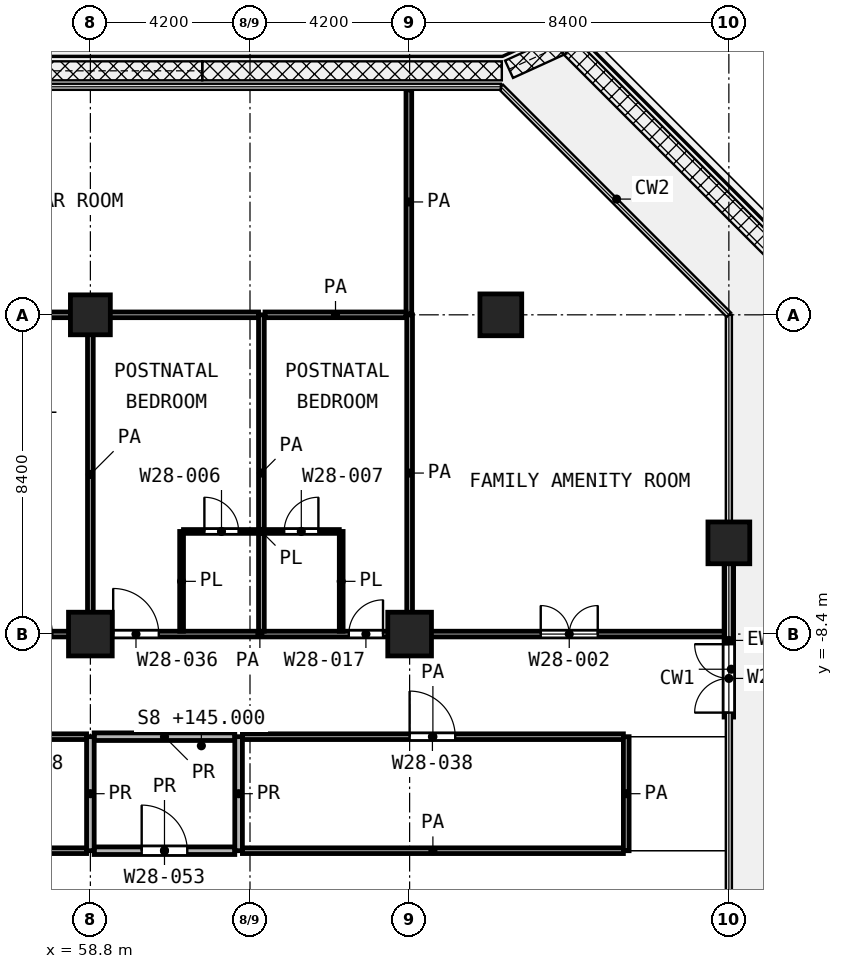
"""IFC4 building model, lengths in metres.
Left out: names, types, materials, properties, quantities, classifications, styles, units other than length and angle.
Written with IfcOpenShell. Run it as: python <this file> out.ifc"""

import sys

from ifc_helpers import new_model, si_unit, direction, frame, frame_2d, origin, origin_2d, place, context, subcontext, project, spatial, rectangle, extrude, element, fill, save


model = new_model("IFC4")
c1 = context("Model", 3, precision=1e-05, world=origin(), true_north=direction((0.0, 1.0)))
c2 = subcontext(c1, "Body", "Model", "MODEL_VIEW")
j1 = project(units=[si_unit("LENGTHUNIT", "METRE"), si_unit("PLANEANGLEUNIT", "RADIAN")], contexts=[c1])
p1 = place(None, origin())
s1 = spatial("IfcSite", under=j1, at=p1, CompositionType="ELEMENT")
p2 = place(p1, origin())
s2 = spatial("IfcBuilding", under=s1, at=p2, CompositionType="ELEMENT")
p3 = place(p2, frame((0.0, 0.0, 145.0)))
s3 = spatial("IfcBuildingStorey", under=s2, at=p3, CompositionType="ELEMENT", Elevation=145.0)
p4 = place(p3, frame((58.8, 0.0, 0.0), z_axis=(0.0, 0.0, 1.0), x_axis=(1.0, 0.0, 0.0)))
e1 = element("IfcColumn", 1, at=p4, inside=s3, PredefinedType="COLUMN", context=c2, shape_type="SweptSolid", body=[
    extrude(rectangle(XDim=1.05, YDim=1.05, at=origin_2d()), origin(), (0.0, 0.0, 1.0), 4.2),
])
for number, where, z_axis, x_axis in (
    (2, (69.6, 0.0, 0.0), (0.0, 0.0, 1.0), (1.0, 0.0, 0.0)),
    (3, (75.6, -6.0, 0.0), (0.0, 0.0, 1.0), (1.0, 0.0, 0.0)),
):
    element("IfcColumn", number, at=place(p3, frame(where, z_axis=z_axis, x_axis=x_axis)), inside=s3, PredefinedType="COLUMN", context=c2, shape_type="SweptSolid", body=[
        extrude(rectangle(XDim=1.1, YDim=1.1, at=origin_2d()), origin(), (0.0, 0.0, 1.0), 4.2),
    ])
for number, where, z_axis, x_axis in (
    (4, (58.8, -8.4, 0.0), (0.0, 0.0, 1.0), (1.0, 0.0, 0.0)),
    (5, (67.2, -8.4, 0.0), (0.0, 0.0, 1.0), (1.0, 0.0, 0.0)),
):
    element("IfcColumn", number, at=place(p3, frame(where, z_axis=z_axis, x_axis=x_axis)), inside=s3, PredefinedType="COLUMN", context=c2, shape_type="SweptSolid", body=[
        extrude(rectangle(XDim=1.15, YDim=1.15, at=origin_2d()), origin(), (0.0, 0.0, 1.0), 4.2),
    ])
p5 = place(p3, frame((75.6, -10.583, 0.0), z_axis=(0.0, 0.0, 1.0), x_axis=(0.0, 1.0, 0.0)))
e6 = element("IfcWall", 6, at=p5, inside=s3, PredefinedType="SOLIDWALL", context=c2, shape_type="SweptSolid", body=[
    extrude(rectangle(XDim=4.033, YDim=0.25, at=frame_2d((2.017, 0.0))), origin(), (0.0, 0.0, 1.0), 3.48),
])
p6 = place(p5, frame((0.117, 0.0, 0.0)))
e7 = element("IfcOpeningElement", 7, at=p6, cuts=e6, PredefinedType="OPENING", context=c2, shape_type="SweptSolid", body=[
    extrude(rectangle(XDim=1.8, YDim=2.1, at=frame_2d((0.9, 1.05))), frame((0.0, 0.135, 0.0), z_axis=(0.0, -1.0, 0.0), x_axis=(1.0, 0.0, 0.0)), (0.0, 0.0, 1.0), 0.27),
])
p7 = place(p3, frame((61.25, -5.7, 0.0), z_axis=(0.0, 0.0, 1.0), x_axis=(1.0, 0.0, 0.0)))
e8 = element("IfcWall", 8, at=p7, inside=s3, PredefinedType="PARTITIONING", context=c2, shape_type="SweptSolid", body=[
    extrude(rectangle(XDim=4.1, YDim=0.1, at=frame_2d((2.05, 0.0))), origin(), (0.0, 0.0, 1.0), 3.6),
])
p8 = place(p7, frame((0.55, 0.0, 0.0)))
e9 = element("IfcOpeningElement", 9, at=p8, cuts=e8, PredefinedType="OPENING", context=c2, shape_type="SweptSolid", body=[
    extrude(rectangle(XDim=0.9, YDim=2.1, at=frame_2d((0.45, 1.05))), frame((0.0, 0.06, 0.0), z_axis=(0.0, -1.0, 0.0), x_axis=(1.0, 0.0, 0.0)), (0.0, 0.0, 1.0), 0.12),
])
p9 = place(p7, frame((2.65, 0.0, 0.0)))
e10 = element("IfcOpeningElement", 10, at=p9, cuts=e8, PredefinedType="OPENING", context=c2, shape_type="SweptSolid", body=[
    extrude(rectangle(XDim=0.9, YDim=2.1, at=frame_2d((0.45, 1.05))), frame((0.0, 0.06, 0.0), z_axis=(0.0, -1.0, 0.0), x_axis=(1.0, 0.0, 0.0)), (0.0, 0.0, 1.0), 0.12),
])
for number, where, z_axis, x_axis in (
    (11, (61.2, -8.325, 0.0), (0.0, 0.0, 1.0), (0.0, 1.0, 0.0)),
    (12, (65.4, -8.325, 0.0), (0.0, 0.0, 1.0), (0.0, 1.0, 0.0)),
):
    element("IfcWall", number, at=place(p3, frame(where, z_axis=z_axis, x_axis=x_axis)), inside=s3, PredefinedType="PARTITIONING", context=c2, shape_type="SweptSolid", body=[
        extrude(rectangle(XDim=2.625, YDim=0.1, at=frame_2d((1.312, 0.0))), origin(), (0.0, 0.0, 1.0), 3.6),
    ])
p10 = place(p3, frame((29.475, -14.1, 0.0), z_axis=(0.0, 0.0, 1.0), x_axis=(1.0, 0.0, 0.0)))
e13 = element("IfcWall", 13, at=p10, inside=s3, PredefinedType="PARTITIONING", context=c2, shape_type="SweptSolid", body=[
    extrude(rectangle(XDim=29.225, YDim=0.15, at=frame_2d((14.612, 0.0))), origin(), (0.0, 0.0, 1.0), 3.6),
])
p11 = place(p10, frame((18.325, 0.0, 0.0)))
e14 = element("IfcOpeningElement", 14, at=p11, cuts=e13, PredefinedType="OPENING", context=c2, shape_type="SweptSolid", body=[
    extrude(rectangle(XDim=1.0, YDim=2.1, at=frame_2d((0.5, 1.05))), frame((0.0, 0.085, 0.0), z_axis=(0.0, -1.0, 0.0), x_axis=(1.0, 0.0, 0.0)), (0.0, 0.0, 1.0), 0.17),
])
p12 = place(p3, frame((62.8, -14.1, 0.0), z_axis=(0.0, 0.0, 1.0), x_axis=(1.0, 0.0, 0.0)))
e15 = element("IfcWall", 15, at=p12, inside=s3, PredefinedType="PARTITIONING", context=c2, shape_type="SweptSolid", body=[
    extrude(rectangle(XDim=10.025, YDim=0.15, at=frame_2d((5.012, 0.0))), origin(), (0.0, 0.0, 1.0), 3.6),
])
p13 = place(p3, frame((29.475, -11.1, 0.0), z_axis=(0.0, 0.0, 1.0), x_axis=(1.0, 0.0, 0.0)))
e16 = element("IfcWall", 16, at=p13, inside=s3, PredefinedType="PARTITIONING", context=c2, shape_type="SweptSolid", body=[
    extrude(rectangle(XDim=29.225, YDim=0.15, at=frame_2d((14.612, 0.0))), origin(), (0.0, 0.0, 1.0), 3.6),
])
p14 = place(p13, frame((3.225, 0.0, 0.0)))
e17 = element("IfcOpeningElement", 17, at=p14, cuts=e16, PredefinedType="OPENING", context=c2, shape_type="SweptSolid", body=[
    extrude(rectangle(XDim=1.2, YDim=2.1, at=frame_2d((0.6, 1.05))), frame((0.0, 0.085, 0.0), z_axis=(0.0, -1.0, 0.0), x_axis=(1.0, 0.0, 0.0)), (0.0, 0.0, 1.0), 0.17),
])
p15 = place(p13, frame((11.725, 0.0, 0.0)))
e18 = element("IfcOpeningElement", 18, at=p15, cuts=e16, PredefinedType="OPENING", context=c2, shape_type="SweptSolid", body=[
    extrude(rectangle(XDim=1.0, YDim=2.1, at=frame_2d((0.5, 1.05))), frame((0.0, 0.085, 0.0), z_axis=(0.0, -1.0, 0.0), x_axis=(1.0, 0.0, 0.0)), (0.0, 0.0, 1.0), 0.17),
])
p16 = place(p13, frame((22.825, 0.0, 0.0)))
e19 = element("IfcOpeningElement", 19, at=p16, cuts=e16, PredefinedType="OPENING", context=c2, shape_type="SweptSolid", body=[
    extrude(rectangle(XDim=1.0, YDim=2.1, at=frame_2d((0.5, 1.05))), frame((0.0, 0.085, 0.0), z_axis=(0.0, -1.0, 0.0), x_axis=(1.0, 0.0, 0.0)), (0.0, 0.0, 1.0), 0.17),
])
p17 = place(p13, frame((27.025, 0.0, 0.0)))
e20 = element("IfcOpeningElement", 20, at=p17, cuts=e16, PredefinedType="OPENING", context=c2, shape_type="SweptSolid", body=[
    extrude(rectangle(XDim=1.0, YDim=2.1, at=frame_2d((0.5, 1.05))), frame((0.0, 0.085, 0.0), z_axis=(0.0, -1.0, 0.0), x_axis=(1.0, 0.0, 0.0)), (0.0, 0.0, 1.0), 0.17),
])
p18 = place(p3, frame((62.8, -11.1, 0.0), z_axis=(0.0, 0.0, 1.0), x_axis=(1.0, 0.0, 0.0)))
e21 = element("IfcWall", 21, at=p18, inside=s3, PredefinedType="PARTITIONING", context=c2, shape_type="SweptSolid", body=[
    extrude(rectangle(XDim=10.025, YDim=0.15, at=frame_2d((5.012, 0.0))), origin(), (0.0, 0.0, 1.0), 3.6),
])
p19 = place(p18, frame((4.4, 0.0, 0.0)))
e22 = element("IfcOpeningElement", 22, at=p19, cuts=e21, PredefinedType="OPENING", context=c2, shape_type="SweptSolid", body=[
    extrude(rectangle(XDim=1.2, YDim=2.1, at=frame_2d((0.6, 1.05))), frame((0.0, 0.085, 0.0), z_axis=(0.0, -1.0, 0.0), x_axis=(1.0, 0.0, 0.0)), (0.0, 0.0, 1.0), 0.17),
])
p20 = place(p3, frame((51.0, -8.4, 0.0), z_axis=(0.0, 0.0, 1.0), x_axis=(1.0, 0.0, 0.0)))
e23 = element("IfcWall", 23, at=p20, inside=s3, PredefinedType="PARTITIONING", context=c2, shape_type="SweptSolid", body=[
    extrude(rectangle(XDim=24.52, YDim=0.15, at=frame_2d((12.26, 0.0))), origin(), (0.0, 0.0, 1.0), 3.6),
])
p21 = place(p20, frame((5.6, 0.0, 0.0)))
e24 = element("IfcOpeningElement", 24, at=p21, cuts=e23, PredefinedType="OPENING", context=c2, shape_type="SweptSolid", body=[
    extrude(rectangle(XDim=1.2, YDim=2.1, at=frame_2d((0.6, 1.05))), frame((0.0, 0.085, 0.0), z_axis=(0.0, -1.0, 0.0), x_axis=(1.0, 0.0, 0.0)), (0.0, 0.0, 1.0), 0.17),
])
p22 = place(p20, frame((8.4, 0.0, 0.0)))
e25 = element("IfcOpeningElement", 25, at=p22, cuts=e23, PredefinedType="OPENING", context=c2, shape_type="SweptSolid", body=[
    extrude(rectangle(XDim=1.2, YDim=2.1, at=frame_2d((0.6, 1.05))), frame((0.0, 0.085, 0.0), z_axis=(0.0, -1.0, 0.0), x_axis=(1.0, 0.0, 0.0)), (0.0, 0.0, 1.0), 0.17),
])
p23 = place(p20, frame((14.6, 0.0, 0.0)))
e26 = element("IfcOpeningElement", 26, at=p23, cuts=e23, PredefinedType="OPENING", context=c2, shape_type="SweptSolid", body=[
    extrude(rectangle(XDim=0.9, YDim=2.1, at=frame_2d((0.45, 1.05))), frame((0.0, 0.085, 0.0), z_axis=(0.0, -1.0, 0.0), x_axis=(1.0, 0.0, 0.0)), (0.0, 0.0, 1.0), 0.17),
])
p24 = place(p20, frame((19.65, 0.0, 0.0)))
e27 = element("IfcOpeningElement", 27, at=p24, cuts=e23, PredefinedType="OPENING", context=c2, shape_type="SweptSolid", body=[
    extrude(rectangle(XDim=1.5, YDim=2.1, at=frame_2d((0.75, 1.05))), frame((0.0, 0.085, 0.0), z_axis=(0.0, -1.0, 0.0), x_axis=(1.0, 0.0, 0.0)), (0.0, 0.0, 1.0), 0.17),
])
p25 = place(p3, frame((51.003, 0.0, 0.0), z_axis=(0.0, 0.0, 1.0), x_axis=(1.0, 0.0, 0.0)))
e28 = element("IfcWall", 28, at=p25, inside=s3, PredefinedType="PARTITIONING", context=c2, shape_type="SweptSolid", body=[
    extrude(rectangle(XDim=12.222, YDim=0.15, at=frame_2d((6.111, 0.0))), origin(), (0.0, 0.0, 1.0), 3.6),
])
p26 = place(p3, frame((63.395, 0.0, 0.0), z_axis=(0.0, 0.0, 1.0), x_axis=(1.0, 0.0, 0.0)))
e29 = element("IfcWall", 29, at=p26, inside=s3, PredefinedType="PARTITIONING", context=c2, shape_type="SweptSolid", body=[
    extrude(rectangle(XDim=3.71, YDim=0.15, at=frame_2d((1.855, 0.0))), origin(), (0.0, 0.0, 1.0), 3.6),
])
p27 = place(p3, frame((58.8, -8.325, 0.0), z_axis=(0.0, 0.0, 1.0), x_axis=(0.0, 1.0, 0.0)))
e30 = element("IfcWall", 30, at=p27, inside=s3, PredefinedType="PARTITIONING", context=c2, shape_type="SweptSolid", body=[
    extrude(rectangle(XDim=8.25, YDim=0.15, at=frame_2d((4.125, 0.0))), origin(), (0.0, 0.0, 1.0), 3.6),
])
p28 = place(p3, frame((63.3, -8.325, 0.0), z_axis=(0.0, 0.0, 1.0), x_axis=(0.0, 1.0, 0.0)))
e31 = element("IfcWall", 31, at=p28, inside=s3, PredefinedType="PARTITIONING", context=c2, shape_type="SweptSolid", body=[
    extrude(rectangle(XDim=8.325, YDim=0.15, at=frame_2d((4.163, 0.0))), origin(), (0.0, 0.0, 1.0), 3.6),
])
p29 = place(p3, frame((67.18, 0.02, 0.0), z_axis=(0.0, 0.0, 1.0), x_axis=(0.0, 1.0, 0.0)))
e32 = element("IfcWall", 32, at=p29, inside=s3, PredefinedType="PARTITIONING", context=c2, shape_type="SweptSolid", body=[
    extrude(rectangle(XDim=5.9, YDim=0.15, at=frame_2d((2.95, 0.0))), origin(), (0.0, 0.0, 1.0), 3.6),
])
p30 = place(p3, frame((67.2, -8.325, 0.0), z_axis=(0.0, 0.0, 1.0), x_axis=(0.0, 1.0, 0.0)))
e33 = element("IfcWall", 33, at=p30, inside=s3, PredefinedType="PARTITIONING", context=c2, shape_type="SweptSolid", body=[
    extrude(rectangle(XDim=8.323, YDim=0.15, at=frame_2d((4.162, 0.0))), origin(), (0.0, 0.0, 1.0), 3.6),
])
p31 = place(p3, frame((72.9, -14.1, 0.0), z_axis=(0.0, 0.0, 1.0), x_axis=(0.0, 1.0, 0.0)))
e34 = element("IfcWall", 34, at=p31, inside=s3, PredefinedType="PARTITIONING", context=c2, shape_type="SweptSolid", body=[
    extrude(rectangle(XDim=3.0, YDim=0.15, at=frame_2d((1.5, 0.0))), origin(), (0.0, 0.0, 1.0), 3.6),
])
p32 = place(p3, frame((58.9, -14.1, 0.0), z_axis=(0.0, 0.0, 1.0), x_axis=(1.0, 0.0, 0.0)))
e35 = element("IfcWall", 35, at=p32, inside=s3, PredefinedType="PARTITIONING", context=c2, shape_type="SweptSolid", body=[
    extrude(rectangle(XDim=3.7, YDim=0.2, at=frame_2d((1.85, 0.0))), origin(), (0.0, 0.0, 1.0), 3.6),
])
p33 = place(p32, frame((1.25, 0.0, 0.0)))
e36 = element("IfcOpeningElement", 36, at=p33, cuts=e35, PredefinedType="OPENING", context=c2, shape_type="SweptSolid", body=[
    extrude(rectangle(XDim=1.2, YDim=2.1, at=frame_2d((0.6, 1.05))), frame((0.0, 0.11, 0.0), z_axis=(0.0, -1.0, 0.0), x_axis=(1.0, 0.0, 0.0)), (0.0, 0.0, 1.0), 0.22),
])
p34 = place(p3, frame((58.9, -11.1, 0.0), z_axis=(0.0, 0.0, 1.0), x_axis=(1.0, 0.0, 0.0)))
e37 = element("IfcWall", 37, at=p34, inside=s3, PredefinedType="PARTITIONING", context=c2, shape_type="SweptSolid", body=[
    extrude(rectangle(XDim=3.7, YDim=0.2, at=frame_2d((1.85, 0.0))), origin(), (0.0, 0.0, 1.0), 3.6),
])
for number, where, z_axis, x_axis in (
    (38, (58.8, -14.1, 0.0), (0.0, 0.0, 1.0), (0.0, 1.0, 0.0)),
    (39, (62.7, -14.1, 0.0), (0.0, 0.0, 1.0), (0.0, 1.0, 0.0)),
):
    element("IfcWall", number, at=place(p3, frame(where, z_axis=z_axis, x_axis=x_axis)), inside=s3, PredefinedType="PARTITIONING", context=c2, shape_type="SweptSolid", body=[
        extrude(rectangle(XDim=3.0, YDim=0.2, at=frame_2d((1.5, 0.0))), origin(), (0.0, 0.0, 1.0), 3.6),
    ])
p35 = place(p6, origin())
e40 = element("IfcDoor", 40, at=p35, inside=s3, OperationType="DOUBLE_DOOR_SINGLE_SWING", PredefinedType="DOOR", context=c2, shape_type="SweptSolid", body=[
    extrude(rectangle(XDim=1.8, YDim=2.1, at=frame_2d((0.9, 1.05))), frame((0.0, 0.025, 0.0), z_axis=(0.0, -1.0, 0.0), x_axis=(1.0, 0.0, 0.0)), (0.0, 0.0, 1.0), 0.05),
])
fill(e7, e40)
p36 = place(p21, origin())
e41 = element("IfcDoor", 41, at=p36, inside=s3, OperationType="SINGLE_SWING_LEFT", PredefinedType="DOOR", context=c2, shape_type="SweptSolid", body=[
    extrude(rectangle(XDim=1.2, YDim=2.1, at=frame_2d((0.6, 1.05))), frame((0.0, 0.025, 0.0), z_axis=(0.0, -1.0, 0.0), x_axis=(1.0, 0.0, 0.0)), (0.0, 0.0, 1.0), 0.05),
])
fill(e24, e41)
p37 = place(p22, origin())
e42 = element("IfcDoor", 42, at=p37, inside=s3, OperationType="SINGLE_SWING_LEFT", PredefinedType="DOOR", context=c2, shape_type="SweptSolid", body=[
    extrude(rectangle(XDim=1.2, YDim=2.1, at=frame_2d((0.6, 1.05))), frame((0.0, 0.025, 0.0), z_axis=(0.0, -1.0, 0.0), x_axis=(1.0, 0.0, 0.0)), (0.0, 0.0, 1.0), 0.05),
])
fill(e25, e42)
p38 = place(p8, origin())
e43 = element("IfcDoor", 43, at=p38, inside=s3, OperationType="SINGLE_SWING_LEFT", PredefinedType="DOOR", context=c2, shape_type="SweptSolid", body=[
    extrude(rectangle(XDim=0.9, YDim=2.1, at=frame_2d((0.45, 1.05))), frame((0.0, 0.025, 0.0), z_axis=(0.0, -1.0, 0.0), x_axis=(1.0, 0.0, 0.0)), (0.0, 0.0, 1.0), 0.05),
])
fill(e9, e43)
p39 = place(p23, origin())
e44 = element("IfcDoor", 44, at=p39, inside=s3, OperationType="SINGLE_SWING_RIGHT", PredefinedType="DOOR", context=c2, shape_type="SweptSolid", body=[
    extrude(rectangle(XDim=0.9, YDim=2.1, at=frame_2d((0.45, 1.05))), frame((0.0, 0.025, 0.0), z_axis=(0.0, -1.0, 0.0), x_axis=(1.0, 0.0, 0.0)), (0.0, 0.0, 1.0), 0.05),
])
fill(e26, e44)
p40 = place(p9, origin())
e45 = element("IfcDoor", 45, at=p40, inside=s3, OperationType="SINGLE_SWING_RIGHT", PredefinedType="DOOR", context=c2, shape_type="SweptSolid", body=[
    extrude(rectangle(XDim=0.9, YDim=2.1, at=frame_2d((0.45, 1.05))), frame((0.0, 0.025, 0.0), z_axis=(0.0, -1.0, 0.0), x_axis=(1.0, 0.0, 0.0)), (0.0, 0.0, 1.0), 0.05),
])
fill(e10, e45)
p41 = place(p24, origin())
e46 = element("IfcDoor", 46, at=p41, inside=s3, OperationType="DOUBLE_DOOR_SINGLE_SWING", PredefinedType="DOOR", context=c2, shape_type="SweptSolid", body=[
    extrude(rectangle(XDim=1.5, YDim=2.1, at=frame_2d((0.75, 1.05))), frame((0.0, 0.025, 0.0), z_axis=(0.0, -1.0, 0.0), x_axis=(1.0, 0.0, 0.0)), (0.0, 0.0, 1.0), 0.05),
])
fill(e27, e46)
p42 = place(p33, origin())
e47 = element("IfcDoor", 47, at=p42, inside=s3, OperationType="SINGLE_SWING_LEFT", PredefinedType="DOOR", context=c2, shape_type="SweptSolid", body=[
    extrude(rectangle(XDim=1.2, YDim=2.1, at=frame_2d((0.6, 1.05))), frame((0.0, 0.025, 0.0), z_axis=(0.0, -1.0, 0.0), x_axis=(1.0, 0.0, 0.0)), (0.0, 0.0, 1.0), 0.05),
])
fill(e36, e47)
p43 = place(p19, origin())
e48 = element("IfcDoor", 48, at=p43, inside=s3, OperationType="SINGLE_SWING_LEFT", PredefinedType="DOOR", context=c2, shape_type="SweptSolid", body=[
    extrude(rectangle(XDim=1.2, YDim=2.1, at=frame_2d((0.6, 1.05))), frame((0.0, 0.025, 0.0), z_axis=(0.0, -1.0, 0.0), x_axis=(1.0, 0.0, 0.0)), (0.0, 0.0, 1.0), 0.05),
])
fill(e22, e48)
save(model, sys.argv[1])
